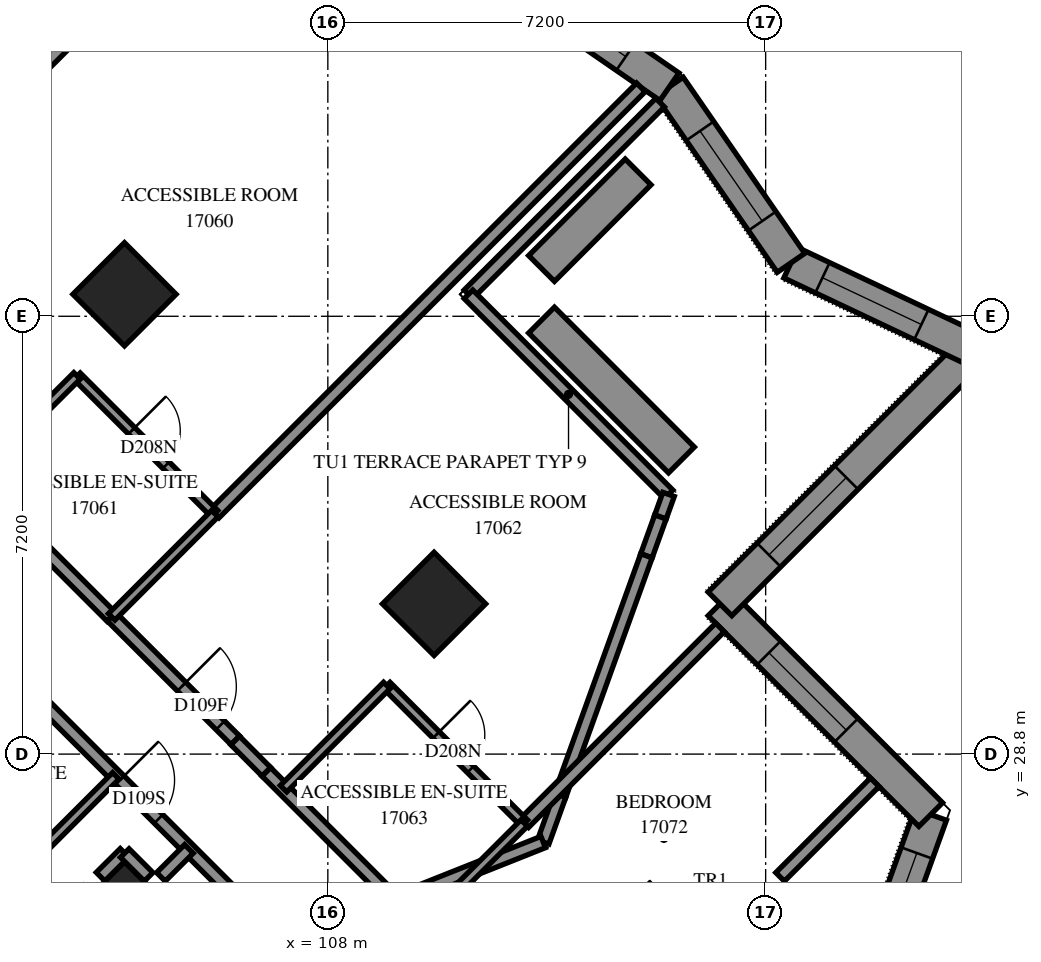
"""IFC4 building model, lengths in metres.
Left out: names, types, materials, properties, quantities, classifications, styles, units other than length and angle.
Written with IfcOpenShell. Run it as: python <this file> out.ifc"""

import sys

from ifc_helpers import new_model, si_unit, direction, frame, frame_2d, origin, origin_2d, place, context, subcontext, project, spatial, polyline, rectangle, outline, extrude, element, fill, save


model = new_model("IFC4")
c1 = context("Model", 3, precision=1e-05, world=origin(), true_north=direction((0.0, 1.0)))
c2 = subcontext(c1, "Body", "Model", "MODEL_VIEW")
j1 = project(units=[si_unit("LENGTHUNIT", "METRE"), si_unit("PLANEANGLEUNIT", "RADIAN")], contexts=[c1])
p1 = place(None, origin())
s1 = spatial("IfcSite", under=j1, at=p1, CompositionType="ELEMENT")
p2 = place(p1, origin())
s2 = spatial("IfcBuilding", under=s1, at=p2, CompositionType="ELEMENT")
p3 = place(p2, frame((0.0, 0.0, 64.4)))
s3 = spatial("IfcBuildingStorey", under=s2, at=p3, CompositionType="ELEMENT", Elevation=64.4)
for number, where, z_axis, x_axis in (
    (1, (104.656, 36.362, 0.0), (0.0, 0.0, 1.0), (0.707, -0.707, 0.0)),
    (2, (109.747, 31.271, 0.0), (0.0, 0.0, 1.0), (0.707, -0.707, 0.0)),
    (3, (104.656, 26.18, 0.0), (0.0, 0.0, 1.0), (0.707, -0.707, 0.0)),
):
    element("IfcColumn", number, at=place(p3, frame(where, z_axis=z_axis, x_axis=x_axis)), inside=s3, PredefinedType="COLUMN", context=c2, shape_type="SweptSolid", body=[
        extrude(rectangle(XDim=1.2, YDim=1.2, at=origin_2d()), origin(), (0.0, 0.0, 1.0), 3.1),
    ])
p4 = place(p3, frame((116.101, 22.778, 0.0), z_axis=(0.0, 0.0, 1.0), x_axis=(0.339264672, 0.9406909601, 0.0)))
e4 = element("IfcWall", 4, at=p4, inside=s3, PredefinedType="SOLIDWALL", context=c2, shape_type="SweptSolid", body=[
    extrude(outline(polyline([(-0.124, -0.275), (5.519, -0.275), (5.17, 0.275), (0.124, 0.275), (-0.124, -0.275)])), origin(), (0.0, 0.0, 1.0), 3.1),
])
p5 = place(p4, frame((0.549, 0.0, 0.7)))
e5 = element("IfcOpeningElement", 5, at=p5, cuts=e4, PredefinedType="OPENING", context=c2, shape_type="SweptSolid", body=[
    extrude(rectangle(XDim=1.8, YDim=2.0, at=frame_2d((0.9, 1.0))), frame((0.0, 0.285, 0.0), z_axis=(0.0, -1.0, 0.0), x_axis=(1.0, 0.0, 0.0)), (0.0, 0.0, 1.0), 0.57),
])
p6 = place(p4, frame((2.873, 0.0, 0.7)))
e6 = element("IfcOpeningElement", 6, at=p6, cuts=e4, PredefinedType="OPENING", context=c2, shape_type="SweptSolid", body=[
    extrude(rectangle(XDim=1.8, YDim=2.0, at=frame_2d((0.9, 1.0))), frame((0.0, 0.285, 0.0), z_axis=(0.0, -1.0, 0.0), x_axis=(1.0, 0.0, 0.0)), (0.0, 0.0, 1.0), 0.57),
])
p7 = place(p3, frame((117.914, 27.805, 0.0), z_axis=(0.0, 0.0, 1.0), x_axis=(-0.7071067812, 0.7071067812, 0.0)))
e7 = element("IfcWall", 7, at=p7, inside=s3, PredefinedType="SOLIDWALL", context=c2, shape_type="SweptSolid", body=[
    extrude(outline(polyline([(-0.175, -0.275), (4.625, -0.275), (5.175, 0.275), (0.175, 0.275), (-0.175, -0.275)])), origin(), (0.0, 0.0, 1.0), 3.1),
])
p8 = place(p7, frame((1.963, 0.0, 0.7)))
e8 = element("IfcOpeningElement", 8, at=p8, cuts=e7, PredefinedType="OPENING", context=c2, shape_type="SweptSolid", body=[
    extrude(rectangle(XDim=1.8, YDim=1.8, at=frame_2d((0.9, 0.9))), frame((0.0, 0.285, 0.0), z_axis=(0.0, -1.0, 0.0), x_axis=(1.0, 0.0, 0.0)), (0.0, 0.0, 1.0), 0.57),
])
p9 = place(p3, frame((114.449, 31.271, 0.0), z_axis=(0.0, 0.0, 1.0), x_axis=(0.7070983275, 0.7071152348, 0.0)))
e9 = element("IfcWall", 9, at=p9, inside=s3, PredefinedType="SOLIDWALL", context=c2, shape_type="SweptSolid", body=[
    extrude(outline(polyline([(0.275, -0.275), (6.305, -0.275), (5.524, 0.275), (-0.275, 0.275), (0.275, -0.275)])), origin(), (0.0, 0.0, 1.0), 3.1),
])
p10 = place(p9, frame((1.137, 0.0, 0.7)))
e10 = element("IfcOpeningElement", 10, at=p10, cuts=e9, PredefinedType="OPENING", context=c2, shape_type="SweptSolid", body=[
    extrude(rectangle(XDim=1.8, YDim=1.8, at=frame_2d((0.9, 0.9))), frame((0.0, 0.285, 0.0), z_axis=(0.0, -1.0, 0.0), x_axis=(1.0, 0.0, 0.0)), (0.0, 0.0, 1.0), 0.57),
])
p11 = place(p3, frame((118.632, 35.453, 0.0), z_axis=(0.0, 0.0, 1.0), x_axis=(-0.9039599594, 0.4276171089, 0.0)))
e11 = element("IfcWall", 11, at=p11, inside=s3, PredefinedType="SOLIDWALL", context=c2, shape_type="SweptSolid", body=[
    extrude(outline(polyline([(-0.39, -0.275), (3.261, -0.275), (3.409, 0.275), (0.39, 0.275), (-0.39, -0.275)])), origin(), (0.0, 0.0, 1.0), 3.1),
])
p12 = place(p11, frame((0.963, 0.0, 0.7)))
e12 = element("IfcOpeningElement", 12, at=p12, cuts=e11, PredefinedType="OPENING", context=c2, shape_type="SweptSolid", body=[
    extrude(rectangle(XDim=1.8, YDim=2.0, at=frame_2d((0.9, 1.0))), frame((0.0, 0.285, 0.0), z_axis=(0.0, -1.0, 0.0), x_axis=(1.0, 0.0, 0.0)), (0.0, 0.0, 1.0), 0.57),
])
p13 = place(p3, frame((115.617, 36.879, 0.0), z_axis=(0.0, 0.0, 1.0), x_axis=(-0.5680848714, 0.8229699745, 0.0)))
e13 = element("IfcWall", 13, at=p13, inside=s3, PredefinedType="SOLIDWALL", context=c2, shape_type="SweptSolid", body=[
    extrude(outline(polyline([(0.074, -0.275), (3.569, -0.275), (3.469, 0.275), (-0.074, 0.275), (0.074, -0.275)])), origin(), (0.0, 0.0, 1.0), 3.1),
])
p14 = place(p13, frame((0.834, 0.0, 0.7)))
e14 = element("IfcOpeningElement", 14, at=p14, cuts=e13, PredefinedType="OPENING", context=c2, shape_type="SweptSolid", body=[
    extrude(rectangle(XDim=1.8, YDim=2.0, at=frame_2d((0.9, 1.0))), frame((0.0, 0.285, 0.0), z_axis=(0.0, -1.0, 0.0), x_axis=(1.0, 0.0, 0.0)), (0.0, 0.0, 1.0), 0.57),
])
p15 = place(p3, frame((113.618, 39.775, 0.0), z_axis=(0.0, 0.0, 1.0), x_axis=(-0.8229761943, 0.5680758609, 0.0)))
e15 = element("IfcWall", 15, at=p15, inside=s3, PredefinedType="SOLIDWALL", context=c2, shape_type="SweptSolid", body=[
    extrude(outline(polyline([(-0.05, -0.275), (3.445, -0.275), (3.546, 0.275), (0.05, 0.275), (-0.05, -0.275)])), origin(), (0.0, 0.0, 1.0), 3.1),
])
p16 = place(p15, frame((0.873, 0.0, 0.7)))
e16 = element("IfcOpeningElement", 16, at=p16, cuts=e15, PredefinedType="OPENING", context=c2, shape_type="SweptSolid", body=[
    extrude(rectangle(XDim=1.8, YDim=2.0, at=frame_2d((0.9, 1.0))), frame((0.0, 0.285, 0.0), z_axis=(0.0, -1.0, 0.0), x_axis=(1.0, 0.0, 0.0)), (0.0, 0.0, 1.0), 0.57),
])
p17 = place(p3, frame((113.464, 39.513, 0.0), z_axis=(0.0, 0.0, 1.0), x_axis=(-0.7071067812, -0.7071067812, 0.0)))
e17 = element("IfcWall", 17, at=p17, inside=s3, PredefinedType="PARAPET", context=c2, shape_type="SweptSolid", body=[
    extrude(outline(polyline([(0.0, -0.1), (4.557, -0.1), (4.357, 0.1), (0.0, 0.1), (0.0, -0.1)])), origin(), (0.0, 0.0, 1.0), 0.25),
])
p18 = place(p3, frame((110.313, 36.362, 0.0), z_axis=(0.0, 0.0, 1.0), x_axis=(0.7070960376, -0.7071175246, 0.0)))
e18 = element("IfcWall", 18, at=p18, inside=s3, PredefinedType="PARAPET", context=c2, shape_type="SweptSolid", body=[
    extrude(outline(polyline([(-0.1, -0.1), (4.59, -0.1), (4.718, 0.1), (0.1, 0.1), (-0.1, -0.1)])), origin(), (0.0, 0.0, 1.0), 0.25),
])
p19 = place(p3, frame((113.603, 33.071, 0.0), z_axis=(0.0, 0.0, 1.0), x_axis=(-0.3390781297, -0.9407582165, 0.0)))
e19 = element("IfcWall", 19, at=p19, inside=s3, PredefinedType="PARAPET", context=c2, shape_type="SweptSolid", body=[
    extrude(outline(polyline([(0.064, -0.1), (0.395, -0.1), (0.395, 0.1), (-0.064, 0.1), (0.064, -0.1)])), origin(), (0.0, 0.0, 1.0), 0.25),
])
p20 = place(p3, frame((113.47, 32.699, 0.0), z_axis=(0.0, 0.0, 1.0), x_axis=(-0.339246254, -0.9406976024, 0.0)))
e20 = element("IfcWall", 20, at=p20, inside=s3, PredefinedType="PARAPET", context=c2, shape_type="SweptSolid", body=[
    extrude(outline(polyline([(0.0, -0.1), (0.679, -0.1), (0.679, 0.1), (0.0, 0.1), (0.0, -0.1)])), origin(), (0.0, 0.0, 1.0), 0.25),
])
p21 = place(p3, frame((113.239, 32.061, 0.0), z_axis=(0.0, 0.0, 1.0), x_axis=(-0.3392575143, -0.9406935415, 0.0)))
e21 = element("IfcWall", 21, at=p21, inside=s3, PredefinedType="PARAPET", context=c2, shape_type="SweptSolid", body=[
    extrude(outline(polyline([(0.0, -0.1), (4.185, -0.1), (4.185, 0.1), (0.0, 0.1), (0.0, -0.1)])), origin(), (0.0, 0.0, 1.0), 0.25),
])
p22 = place(p3, frame((111.819, 28.124, 0.0), z_axis=(0.0, 0.0, 1.0), x_axis=(-0.3392690321, -0.9406893876, 0.0)))
e22 = element("IfcWall", 22, at=p22, inside=s3, PredefinedType="PARAPET", context=c2, shape_type="SweptSolid", body=[
    extrude(outline(polyline([(0.0, -0.1), (0.773, -0.1), (0.863, 0.1), (0.0, 0.1), (0.0, -0.1)])), origin(), (0.0, 0.0, 1.0), 0.25),
])
p23 = place(p3, frame((111.542, 27.354, 0.0), z_axis=(0.0, 0.0, 1.0), x_axis=(-0.9291537819, -0.3696934536, 0.0)))
e23 = element("IfcWall", 23, at=p23, inside=s3, PredefinedType="PARAPET", context=c2, shape_type="SweptSolid", body=[
    extrude(outline(polyline([(0.045, -0.1), (5.612, -0.1), (5.526, 0.1), (-0.045, 0.1), (0.045, -0.1)])), origin(), (0.0, 0.0, 1.0), 0.25),
])
p24 = place(p3, frame((111.515, 35.938, 0.0), z_axis=(0.0, 0.0, 1.0), x_axis=(0.7070914108, -0.7071221512, 0.0)))
e24 = element("IfcWall", 24, at=p24, inside=s3, PredefinedType="SOLIDWALL", context=c2, shape_type="SweptSolid", body=[
    extrude(rectangle(XDim=3.253, YDim=0.6, at=frame_2d((1.627, 0.0))), origin(), (0.0, 0.0, 1.0), 0.65),
])
p25 = place(p3, frame((101.825, 31.125, 0.0), z_axis=(0.0, 0.0, 1.0), x_axis=(0.7071067812, -0.7071067812, 0.0)))
e25 = element("IfcWall", 25, at=p25, inside=s3, PredefinedType="PARTITIONING", context=c2, shape_type="SweptSolid", body=[
    extrude(rectangle(XDim=12.7, YDim=0.2, at=frame_2d((6.35, 0.0))), origin(), (0.0, 0.0, 1.0), 3.1),
])
p26 = place(p25, frame((3.895, 0.0, 0.0)))
e26 = element("IfcOpeningElement", 26, at=p26, cuts=e25, PredefinedType="OPENING", context=c2, shape_type="SweptSolid", body=[
    extrude(rectangle(XDim=0.9, YDim=2.1, at=frame_2d((0.45, 1.05))), frame((0.0, 0.11, 0.0), z_axis=(0.0, -1.0, 0.0), x_axis=(1.0, 0.0, 0.0)), (0.0, 0.0, 1.0), 0.22),
])
p27 = place(p25, frame((9.056, 0.0, 0.0)))
e27 = element("IfcOpeningElement", 27, at=p27, cuts=e25, PredefinedType="OPENING", context=c2, shape_type="SweptSolid", body=[
    extrude(rectangle(XDim=1.0, YDim=2.1, at=frame_2d((0.5, 1.05))), frame((0.0, 0.11, 0.0), z_axis=(0.0, -1.0, 0.0), x_axis=(1.0, 0.0, 0.0)), (0.0, 0.0, 1.0), 0.22),
])
p28 = place(p3, frame((106.14, 32.756, 0.0), z_axis=(0.0, 0.0, 1.0), x_axis=(0.7071017366, 0.7071118258, 0.0)))
e28 = element("IfcWall", 28, at=p28, inside=s3, PredefinedType="PARTITIONING", context=c2, shape_type="SweptSolid", body=[
    extrude(rectangle(XDim=9.912, YDim=0.2, at=frame_2d((4.956, 0.0))), origin(), (0.0, 0.0, 1.0), 3.1),
])
p29 = place(p3, frame((101.049, 37.847, 0.0), z_axis=(0.0, 0.0, 1.0), x_axis=(0.7071067812, 0.7071067812, 0.0)))
e29 = element("IfcWall", 29, at=p29, inside=s3, PredefinedType="PARTITIONING", context=c2, shape_type="SweptSolid", body=[
    extrude(rectangle(XDim=9.852, YDim=0.2, at=frame_2d((4.926, 0.0))), origin(), (0.0, 0.0, 1.0), 3.1),
])
p30 = place(p3, frame((99.349, 36.147, 0.0), z_axis=(0.0, 0.0, 1.0), x_axis=(0.7071067812, -0.7071067812, 0.0)))
e30 = element("IfcWall", 30, at=p30, inside=s3, PredefinedType="PARTITIONING", context=c2, shape_type="SweptSolid", body=[
    extrude(rectangle(XDim=7.201, YDim=0.2, at=frame_2d((3.601, 0.0))), origin(), (0.0, 0.0, 1.0), 3.1),
])
p31 = place(p30, frame((2.358, 0.0, 0.0)))
e31 = element("IfcOpeningElement", 31, at=p31, cuts=e30, PredefinedType="OPENING", context=c2, shape_type="SweptSolid", body=[
    extrude(rectangle(XDim=0.9, YDim=2.1, at=frame_2d((0.45, 1.05))), frame((0.0, 0.11, 0.0), z_axis=(0.0, -1.0, 0.0), x_axis=(1.0, 0.0, 0.0)), (0.0, 0.0, 1.0), 0.22),
])
p32 = place(p3, frame((106.987, 28.509, 0.0), z_axis=(0.0, 0.0, 1.0), x_axis=(0.7071067812, -0.7071067812, 0.0)))
e32 = element("IfcWall", 32, at=p32, inside=s3, PredefinedType="PARTITIONING", context=c2, shape_type="SweptSolid", body=[
    extrude(rectangle(XDim=7.198, YDim=0.2, at=frame_2d((3.599, 0.0))), origin(), (0.0, 0.0, 1.0), 3.1),
])
p33 = place(p32, frame((4.004, 0.0, 0.0)))
e33 = element("IfcOpeningElement", 33, at=p33, cuts=e32, PredefinedType="OPENING", context=c2, shape_type="SweptSolid", body=[
    extrude(rectangle(XDim=0.9, YDim=2.1, at=frame_2d((0.45, 1.05))), frame((0.0, 0.11, 0.0), z_axis=(0.0, -1.0, 0.0), x_axis=(1.0, 0.0, 0.0)), (0.0, 0.0, 1.0), 0.22),
])
p34 = place(p3, frame((111.231, 27.665, 0.0), z_axis=(0.0, 0.0, 1.0), x_axis=(0.7071067812, 0.7071067812, 0.0)))
e34 = element("IfcWall", 34, at=p34, inside=s3, PredefinedType="PARTITIONING", context=c2, shape_type="SweptSolid", body=[
    extrude(rectangle(XDim=4.55, YDim=0.2, at=frame_2d((2.275, 0.0))), origin(), (0.0, 0.0, 1.0), 3.1),
])
p35 = place(p3, frame((108.97, 29.928, 0.0), z_axis=(0.0, 0.0, 1.0), x_axis=(0.7067942478, -0.7074191764, 0.0)))
e35 = element("IfcWall", 35, at=p35, inside=s3, PredefinedType="PARTITIONING", context=c2, shape_type="SweptSolid", body=[
    extrude(rectangle(XDim=3.2, YDim=0.15, at=frame_2d((1.6, 0.0))), origin(), (0.0, 0.0, 1.0), 3.1),
])
p36 = place(p35, frame((1.148, 0.0, 0.0)))
e36 = element("IfcOpeningElement", 36, at=p36, cuts=e35, PredefinedType="OPENING", context=c2, shape_type="SweptSolid", body=[
    extrude(rectangle(XDim=0.8, YDim=2.1, at=frame_2d((0.4, 1.05))), frame((0.0, 0.085, 0.0), z_axis=(0.0, -1.0, 0.0), x_axis=(1.0, 0.0, 0.0)), (0.0, 0.0, 1.0), 0.17),
])
p37 = place(p3, frame((103.875, 35.015, 0.0), z_axis=(0.0, 0.0, 1.0), x_axis=(0.7071067812, -0.7071067812, 0.0)))
e37 = element("IfcWall", 37, at=p37, inside=s3, PredefinedType="PARTITIONING", context=c2, shape_type="SweptSolid", body=[
    extrude(rectangle(XDim=3.199, YDim=0.15, at=frame_2d((1.599, 0.0))), origin(), (0.0, 0.0, 1.0), 3.1),
])
p38 = place(p37, frame((1.27, 0.0, 0.0)))
e38 = element("IfcOpeningElement", 38, at=p38, cuts=e37, PredefinedType="OPENING", context=c2, shape_type="SweptSolid", body=[
    extrude(rectangle(XDim=0.8, YDim=2.1, at=frame_2d((0.4, 1.05))), frame((0.0, 0.085, 0.0), z_axis=(0.0, -1.0, 0.0), x_axis=(1.0, 0.0, 0.0)), (0.0, 0.0, 1.0), 0.17),
])
p39 = place(p3, frame((104.445, 31.059, 0.0), z_axis=(0.0, 0.0, 1.0), x_axis=(0.7074545101, -0.7067588812, 0.0)))
e39 = element("IfcWall", 39, at=p39, inside=s3, PredefinedType="PARTITIONING", context=c2, shape_type="SweptSolid", body=[
    extrude(rectangle(XDim=2.875, YDim=0.2, at=frame_2d((1.438, 0.0))), origin(), (0.0, 0.0, 1.0), 3.1),
])
p40 = place(p39, frame((1.626, 0.0, 0.0)))
e40 = element("IfcOpeningElement", 40, at=p40, cuts=e39, PredefinedType="OPENING", context=c2, shape_type="SweptSolid", body=[
    extrude(rectangle(XDim=0.9, YDim=2.1, at=frame_2d((0.45, 1.05))), frame((0.0, 0.11, 0.0), z_axis=(0.0, -1.0, 0.0), x_axis=(1.0, 0.0, 0.0)), (0.0, 0.0, 1.0), 0.22),
])
p41 = place(p3, frame((107.271, 28.231, 0.0), z_axis=(0.0, 0.0, 1.0), x_axis=(0.7071067812, 0.7071067812, 0.0)))
e41 = element("IfcWall", 41, at=p41, inside=s3, PredefinedType="PARTITIONING", context=c2, shape_type="SweptSolid", body=[
    extrude(rectangle(XDim=2.401, YDim=0.15, at=frame_2d((1.201, 0.0))), origin(), (0.0, 0.0, 1.0), 3.1),
])
for number, where, z_axis, x_axis in (
    (42, (104.445, 31.057, 0.0), (0.0, 0.0, 1.0), (0.707, 0.708, 0.0)),
    (43, (102.177, 33.325, 0.0), (0.0, 0.0, 1.0), (0.708, 0.707, 0.0)),
    (44, (109.531, 25.971, 0.0), (0.0, 0.0, 1.0), (0.708, 0.707, 0.0)),
):
    element("IfcWall", number, at=place(p3, frame(where, z_axis=z_axis, x_axis=x_axis)), inside=s3, PredefinedType="PARTITIONING", context=c2, shape_type="SweptSolid", body=[
        extrude(rectangle(XDim=2.4, YDim=0.15, at=frame_2d((1.2, 0.0))), origin(), (0.0, 0.0, 1.0), 3.1),
    ])
p42 = place(p3, frame((102.817, 26.747, 0.0), z_axis=(0.0, 0.0, 1.0), x_axis=(0.7071067812, 0.7071067812, 0.0)))
e45 = element("IfcWall", 45, at=p42, inside=s3, PredefinedType="PARTITIONING", context=c2, shape_type="SweptSolid", body=[
    extrude(rectangle(XDim=2.398, YDim=0.15, at=frame_2d((1.199, 0.0))), origin(), (0.0, 0.0, 1.0), 3.1),
])
p43 = place(p3, frame((115.438, 26.78, 0.0), z_axis=(0.0, 0.0, 1.0), x_axis=(0.7071067812, 0.7071067812, 0.0)))
e46 = element("IfcWall", 46, at=p43, inside=s3, PredefinedType="PARTITIONING", context=c2, shape_type="SweptSolid", body=[
    extrude(rectangle(XDim=2.201, YDim=0.2, at=frame_2d((1.101, 0.0))), origin(), (0.0, 0.0, 1.0), 3.1),
])
p44 = place(p3, frame((106.476, 29.024, 0.0), z_axis=(0.0, 0.0, 1.0), x_axis=(0.7057270646, -0.7084838109, 0.0)))
e47 = element("IfcWall", 47, at=p44, inside=s3, PredefinedType="PARTITIONING", context=c2, shape_type="SweptSolid", body=[
    extrude(rectangle(XDim=0.726, YDim=0.2, at=frame_2d((0.363, 0.0))), origin(), (0.0, 0.0, 1.0), 3.1),
])
p45 = place(p3, frame((105.255, 26.781, 0.0), z_axis=(0.0, 0.0, 1.0), x_axis=(0.7071067812, 0.7071067812, 0.0)))
e48 = element("IfcWall", 48, at=p45, inside=s3, PredefinedType="PARTITIONING", context=c2, shape_type="SweptSolid", body=[
    extrude(rectangle(XDim=0.65, YDim=0.2, at=frame_2d((0.325, 0.0))), origin(), (0.0, 0.0, 1.0), 2.6),
])
p46 = place(p3, frame((104.263, 26.784, 0.0), z_axis=(0.0, 0.0, 1.0), x_axis=(0.7089037401, 0.705305244, 0.0)))
e49 = element("IfcWall", 49, at=p46, inside=s3, PredefinedType="PARTITIONING", context=c2, shape_type="SweptSolid", body=[
    extrude(rectangle(XDim=0.556, YDim=0.2, at=frame_2d((0.278, 0.0))), origin(), (0.0, 0.0, 1.0), 3.1),
])
p47 = place(p3, frame((104.66, 27.172, 0.0), z_axis=(0.0, 0.0, 1.0), x_axis=(0.7071067812, -0.7071067812, 0.0)))
e50 = element("IfcWall", 50, at=p47, inside=s3, PredefinedType="PARTITIONING", context=c2, shape_type="SweptSolid", body=[
    extrude(rectangle(XDim=0.554, YDim=0.2, at=frame_2d((0.277, 0.0))), origin(), (0.0, 0.0, 1.0), 3.1),
])
p48 = place(p3, frame((113.103, 38.374, 0.0), z_axis=(0.0, 0.0, 1.0), x_axis=(-0.7071290498, -0.7070845119, 0.0)))
e51 = element("IfcWall", 51, at=p48, inside=s3, PredefinedType="SOLIDWALL", context=c2, shape_type="SweptSolid", body=[
    extrude(outline(polyline([(0.0, -0.3), (2.245, -0.3), (2.245, 0.3), (0.0, 0.3), (0.0, -0.3)])), origin(), (0.0, 0.0, 1.0), 0.65),
])
p49 = place(p6, origin())
e52 = element("IfcWindow", 52, at=p49, inside=s3, PartitioningType="SINGLE_PANEL", PredefinedType="WINDOW", context=c2, shape_type="SweptSolid", body=[
    extrude(rectangle(XDim=1.8, YDim=2.0, at=frame_2d((0.9, 1.0))), frame((0.0, 0.155, 0.0), z_axis=(0.0, -1.0, 0.0), x_axis=(1.0, 0.0, 0.0)), (0.0, 0.0, 1.0), 0.06),
])
fill(e6, e52)
p50 = place(p8, origin())
e53 = element("IfcWindow", 53, at=p50, inside=s3, PartitioningType="SINGLE_PANEL", PredefinedType="WINDOW", context=c2, shape_type="SweptSolid", body=[
    extrude(rectangle(XDim=1.8, YDim=1.8, at=frame_2d((0.9, 0.9))), frame((0.0, 0.155, 0.0), z_axis=(0.0, -1.0, 0.0), x_axis=(1.0, 0.0, 0.0)), (0.0, 0.0, 1.0), 0.06),
])
fill(e8, e53)
p51 = place(p10, origin())
e54 = element("IfcWindow", 54, at=p51, inside=s3, PartitioningType="SINGLE_PANEL", PredefinedType="WINDOW", context=c2, shape_type="SweptSolid", body=[
    extrude(rectangle(XDim=1.8, YDim=1.8, at=frame_2d((0.9, 0.9))), frame((0.0, 0.155, 0.0), z_axis=(0.0, -1.0, 0.0), x_axis=(1.0, 0.0, 0.0)), (0.0, 0.0, 1.0), 0.06),
])
fill(e10, e54)
p52 = place(p12, origin())
e55 = element("IfcWindow", 55, at=p52, inside=s3, PartitioningType="SINGLE_PANEL", PredefinedType="WINDOW", context=c2, shape_type="SweptSolid", body=[
    extrude(rectangle(XDim=1.8, YDim=2.0, at=frame_2d((0.9, 1.0))), frame((0.0, 0.155, 0.0), z_axis=(0.0, -1.0, 0.0), x_axis=(1.0, 0.0, 0.0)), (0.0, 0.0, 1.0), 0.06),
])
fill(e12, e55)
p53 = place(p14, origin())
e56 = element("IfcWindow", 56, at=p53, inside=s3, PartitioningType="SINGLE_PANEL", PredefinedType="WINDOW", context=c2, shape_type="SweptSolid", body=[
    extrude(rectangle(XDim=1.8, YDim=2.0, at=frame_2d((0.9, 1.0))), frame((0.0, 0.155, 0.0), z_axis=(0.0, -1.0, 0.0), x_axis=(1.0, 0.0, 0.0)), (0.0, 0.0, 1.0), 0.06),
])
fill(e14, e56)
p54 = place(p16, origin())
e57 = element("IfcWindow", 57, at=p54, inside=s3, PartitioningType="SINGLE_PANEL", PredefinedType="WINDOW", context=c2, shape_type="SweptSolid", body=[
    extrude(rectangle(XDim=1.8, YDim=2.0, at=frame_2d((0.9, 1.0))), frame((0.0, 0.155, 0.0), z_axis=(0.0, -1.0, 0.0), x_axis=(1.0, 0.0, 0.0)), (0.0, 0.0, 1.0), 0.06),
])
fill(e16, e57)
p55 = place(p38, origin())
e58 = element("IfcDoor", 58, at=p55, inside=s3, OperationType="SINGLE_SWING_RIGHT", PredefinedType="DOOR", context=c2, shape_type="SweptSolid", body=[
    extrude(rectangle(XDim=0.8, YDim=2.1, at=frame_2d((0.4, 1.05))), frame((0.0, 0.025, 0.0), z_axis=(0.0, -1.0, 0.0), x_axis=(1.0, 0.0, 0.0)), (0.0, 0.0, 1.0), 0.05),
])
fill(e38, e58)
p56 = place(p40, origin())
e59 = element("IfcDoor", 59, at=p56, inside=s3, OperationType="SINGLE_SWING_RIGHT", PredefinedType="DOOR", context=c2, shape_type="SweptSolid", body=[
    extrude(rectangle(XDim=0.9, YDim=2.1, at=frame_2d((0.45, 1.05))), frame((0.0, 0.025, 0.0), z_axis=(0.0, -1.0, 0.0), x_axis=(1.0, 0.0, 0.0)), (0.0, 0.0, 1.0), 0.05),
])
fill(e40, e59)
p57 = place(p36, origin())
e60 = element("IfcDoor", 60, at=p57, inside=s3, OperationType="SINGLE_SWING_RIGHT", PredefinedType="DOOR", context=c2, shape_type="SweptSolid", body=[
    extrude(rectangle(XDim=0.8, YDim=2.1, at=frame_2d((0.4, 1.05))), frame((0.0, 0.025, 0.0), z_axis=(0.0, -1.0, 0.0), x_axis=(1.0, 0.0, 0.0)), (0.0, 0.0, 1.0), 0.05),
])
fill(e36, e60)
p58 = place(p26, origin())
e61 = element("IfcDoor", 61, at=p58, inside=s3, OperationType="SINGLE_SWING_LEFT", PredefinedType="DOOR", context=c2, shape_type="SweptSolid", body=[
    extrude(rectangle(XDim=0.9, YDim=2.1, at=frame_2d((0.45, 1.05))), frame((0.0, 0.025, 0.0), z_axis=(0.0, -1.0, 0.0), x_axis=(1.0, 0.0, 0.0)), (0.0, 0.0, 1.0), 0.05),
])
fill(e26, e61)
save(model, sys.argv[1])
